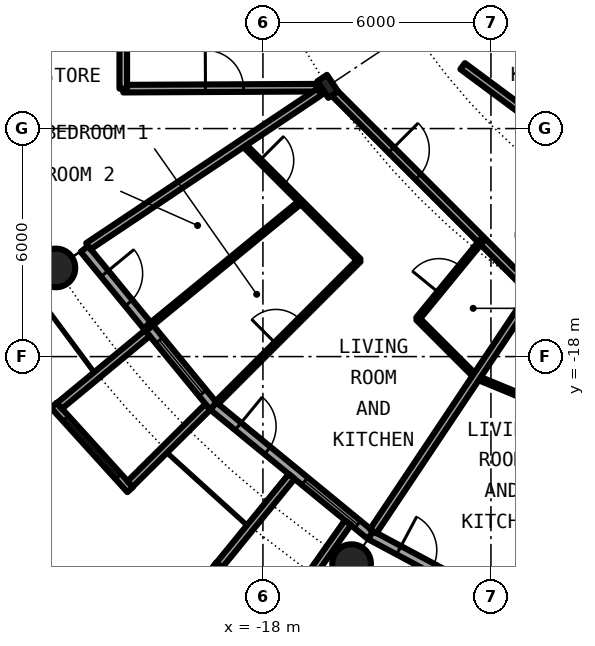
"""IFC4 building model, lengths in metres.
Left out: names, types, materials, properties, quantities, classifications, styles, units other than length and angle.
Written with IfcOpenShell. Run it as: python <this file> out.ifc"""

import sys

from ifc_helpers import new_model, si_unit, direction, frame, frame_2d, origin, origin_2d, place, context, subcontext, project, spatial, rectangle, circle, hollow_circle, i_section, extrude, element, fill, save


model = new_model("IFC4")
c1 = context("Model", 3, precision=1e-05, world=origin(), true_north=direction((0.0, 1.0)))
c2 = subcontext(c1, "Body", "Model", "MODEL_VIEW")
j1 = project(units=[si_unit("LENGTHUNIT", "METRE"), si_unit("PLANEANGLEUNIT", "RADIAN")], contexts=[c1])
p1 = place(None, origin())
s1 = spatial("IfcSite", under=j1, at=p1, CompositionType="ELEMENT")
p2 = place(p1, origin())
s2 = spatial("IfcBuilding", under=s1, at=p2, CompositionType="ELEMENT")
p3 = place(p2, frame((0.0, 0.0, 63.6)))
s3 = spatial("IfcBuildingStorey", under=s2, at=p3, CompositionType="ELEMENT", Elevation=63.6)
for number, where, z_axis, x_axis in (
    (1, (-23.448, -15.667, 0.0), (0.0, 0.0, 1.0), (1.0, 0.0, 0.0)),
    (2, (-15.667, -23.448, 0.0), (0.0, 0.0, 1.0), (1.0, 0.0, 0.0)),
):
    element("IfcColumn", number, at=place(p3, frame(where, z_axis=z_axis, x_axis=x_axis)), inside=s3, PredefinedType="COLUMN", context=c2, shape_type="SweptSolid", body=[
        extrude(hollow_circle(Radius=0.508, WallThickness=0.04, at=origin_2d()), origin(), (0.0, 0.0, 1.0), 3.05),
    ])
p4 = place(p3, frame((-16.297, -10.889, 0.0), z_axis=(0.0, 0.0, 1.0), x_axis=(-0.831469612303, -0.55557023302, 0.0)))
e3 = element("IfcColumn", 3, at=p4, inside=s3, PredefinedType="COLUMN", context=c2, shape_type="SweptSolid", body=[
    extrude(i_section(OverallWidth=0.306, OverallDepth=0.524, WebThickness=0.021, FlangeThickness=0.04, FilletRadius=0.027, at=origin_2d()), origin(), (0.0, 0.0, 1.0), 3.05),
])
p5 = place(p3, frame((-22.699, -15.167, 0.0), z_axis=(0.0, 0.0, 1.0), x_axis=(0.634382322723, -0.773019449054, 0.0)))
e4 = element("IfcWall", 4, at=p5, inside=s3, PredefinedType="SOLIDWALL", context=c2, shape_type="SweptSolid", body=[
    extrude(rectangle(XDim=5.352, YDim=0.25, at=frame_2d((2.676, 0.0))), origin(), (0.0, 0.0, 1.0), 2.7),
])
p6 = place(p5, frame((0.841, 0.0, 0.0)))
e5 = element("IfcOpeningElement", 5, at=p6, cuts=e4, PredefinedType="OPENING", context=c2, shape_type="SweptSolid", body=[
    extrude(rectangle(XDim=1.0, YDim=2.2, at=frame_2d((0.5, 1.1))), frame((0.0, 0.135, 0.0), z_axis=(0.0, -1.0, 0.0), x_axis=(1.0, 0.0, 0.0)), (0.0, 0.0, 1.0), 0.27),
])
p7 = place(p5, frame((3.111, 0.0, 0.3)))
e6 = element("IfcOpeningElement", 6, at=p7, cuts=e4, PredefinedType="OPENING", context=c2, shape_type="SweptSolid", body=[
    extrude(rectangle(XDim=1.8, YDim=2.1, at=frame_2d((0.9, 1.05))), frame((0.0, 0.135, 0.0), z_axis=(0.0, -1.0, 0.0), x_axis=(1.0, 0.0, 0.0)), (0.0, 0.0, 1.0), 0.27),
])
p8 = place(p3, frame((-23.503, -19.282, -0.03), z_axis=(0.0, 0.0, 1.0), x_axis=(0.671506829416, -0.740998365753, 0.0)))
e7 = element("IfcWall", 7, at=p8, inside=s3, PredefinedType="SOLIDWALL", context=c2, shape_type="SweptSolid", body=[
    extrude(rectangle(XDim=2.993, YDim=0.2, at=frame_2d((1.497, 0.0))), origin(), (0.0, 0.0, 1.0), 2.73),
])
p9 = place(p8, frame((0.457, 0.0, 0.33)))
e8 = element("IfcOpeningElement", 8, at=p9, cuts=e7, PredefinedType="OPENING", context=c2, shape_type="SweptSolid", body=[
    extrude(circle(Radius=1.04, at=frame_2d((1.04, 1.04))), frame((0.0, 0.11, 0.0), z_axis=(0.0, -1.0, 0.0), x_axis=(1.0, 0.0, 0.0)), (0.0, 0.0, 1.0), 0.22),
])
p10 = place(p3, frame((-21.041, -17.384, -0.03), z_axis=(0.0, 0.0, 1.0), x_axis=(-0.770784861449, -0.63709551667, 0.0)))
e9 = element("IfcWall", 9, at=p10, inside=s3, PredefinedType="SOLIDWALL", context=c2, shape_type="SweptSolid", body=[
    extrude(rectangle(XDim=3.006, YDim=0.2, at=frame_2d((1.503, 0.0))), origin(), (0.0, 0.0, 1.0), 2.73),
])
p11 = place(p3, frame((-19.45, -19.323, -0.03), z_axis=(0.0, 0.0, 1.0), x_axis=(-0.709727076896, -0.704476739375, 0.0)))
e10 = element("IfcWall", 10, at=p11, inside=s3, PredefinedType="SOLIDWALL", context=c2, shape_type="SweptSolid", body=[
    extrude(rectangle(XDim=2.883, YDim=0.2, at=frame_2d((1.441, 0.0))), origin(), (0.0, 0.0, 1.0), 2.73),
])
p12 = place(p3, frame((-19.304, -19.304, 0.0), z_axis=(0.0, 0.0, 1.0), x_axis=(0.773019449054, -0.634382322723, 0.0)))
e11 = element("IfcWall", 11, at=p12, inside=s3, PredefinedType="SOLIDWALL", context=c2, shape_type="SweptSolid", body=[
    extrude(rectangle(XDim=5.352, YDim=0.25, at=frame_2d((2.676, 0.0))), origin(), (0.0, 0.0, 1.0), 2.7),
])
p13 = place(p12, frame((0.841, 0.0, 0.0)))
e12 = element("IfcOpeningElement", 12, at=p13, cuts=e11, PredefinedType="OPENING", context=c2, shape_type="SweptSolid", body=[
    extrude(rectangle(XDim=1.0, YDim=2.2, at=frame_2d((0.5, 1.1))), frame((0.0, 0.135, 0.0), z_axis=(0.0, -1.0, 0.0), x_axis=(1.0, 0.0, 0.0)), (0.0, 0.0, 1.0), 0.27),
])
p14 = place(p12, frame((3.111, 0.0, 0.3)))
e13 = element("IfcOpeningElement", 13, at=p14, cuts=e11, PredefinedType="OPENING", context=c2, shape_type="SweptSolid", body=[
    extrude(rectangle(XDim=1.8, YDim=2.1, at=frame_2d((0.9, 1.05))), frame((0.0, 0.135, 0.0), z_axis=(0.0, -1.0, 0.0), x_axis=(1.0, 0.0, 0.0)), (0.0, 0.0, 1.0), 0.27),
])
p15 = place(p3, frame((-19.289, -23.497, -0.03), z_axis=(0.0, 0.0, 1.0), x_axis=(0.796842165306, -0.60418752353, 0.0)))
e14 = element("IfcWall", 14, at=p15, inside=s3, PredefinedType="SOLIDWALL", context=c2, shape_type="SweptSolid", body=[
    extrude(rectangle(XDim=2.337, YDim=0.2, at=frame_2d((1.168, 0.0))), origin(), (0.0, 0.0, 1.0), 2.73),
])
p16 = place(p15, frame((0.128, 0.0, 0.33)))
e15 = element("IfcOpeningElement", 15, at=p16, cuts=e14, PredefinedType="OPENING", context=c2, shape_type="SweptSolid", body=[
    extrude(circle(Radius=1.04, at=frame_2d((1.04, 1.04))), frame((0.0, 0.11, 0.0), z_axis=(0.0, -1.0, 0.0), x_axis=(1.0, 0.0, 0.0)), (0.0, 0.0, 1.0), 0.22),
])
p17 = place(p3, frame((-17.246, -21.155, -0.03), z_axis=(0.0, 0.0, 1.0), x_axis=(-0.631741648902, -0.775179004516, 0.0)))
e16 = element("IfcWall", 16, at=p17, inside=s3, PredefinedType="SOLIDWALL", context=c2, shape_type="SweptSolid", body=[
    extrude(rectangle(XDim=3.006, YDim=0.2, at=frame_2d((1.503, 0.0))), origin(), (0.0, 0.0, 1.0), 2.73),
])
p18 = place(p3, frame((-15.765, -22.37, -0.03), z_axis=(0.0, 0.0, 1.0), x_axis=(-0.576274612209, -0.817256123454, 0.0)))
e17 = element("IfcWall", 17, at=p18, inside=s3, PredefinedType="SOLIDWALL", context=c2, shape_type="SweptSolid", body=[
    extrude(rectangle(XDim=2.933, YDim=0.2, at=frame_2d((1.466, 0.0))), origin(), (0.0, 0.0, 1.0), 2.73),
])
p19 = place(p3, frame((-15.167, -22.699, 0.0), z_axis=(0.0, 0.0, 1.0), x_axis=(0.881915646801, -0.471407246368, 0.0)))
e18 = element("IfcWall", 18, at=p19, inside=s3, PredefinedType="SOLIDWALL", context=c2, shape_type="SweptSolid", body=[
    extrude(rectangle(XDim=5.352, YDim=0.25, at=frame_2d((2.676, 0.0))), origin(), (0.0, 0.0, 1.0), 2.7),
])
p20 = place(p19, frame((0.841, 0.0, 0.0)))
e19 = element("IfcOpeningElement", 19, at=p20, cuts=e18, PredefinedType="OPENING", context=c2, shape_type="SweptSolid", body=[
    extrude(rectangle(XDim=1.0, YDim=2.2, at=frame_2d((0.5, 1.1))), frame((0.0, 0.135, 0.0), z_axis=(0.0, -1.0, 0.0), x_axis=(1.0, 0.0, 0.0)), (0.0, 0.0, 1.0), 0.27),
])
p21 = place(p19, frame((3.111, 0.0, 0.3)))
e20 = element("IfcOpeningElement", 20, at=p21, cuts=e18, PredefinedType="OPENING", context=c2, shape_type="SweptSolid", body=[
    extrude(rectangle(XDim=1.8, YDim=2.1, at=frame_2d((0.9, 1.05))), frame((0.0, 0.135, 0.0), z_axis=(0.0, -1.0, 0.0), x_axis=(1.0, 0.0, 0.0)), (0.0, 0.0, 1.0), 0.27),
])
p22 = place(p3, frame((-18.545, -12.386, 0.0), z_axis=(0.0, 0.0, 1.0), x_axis=(0.707106781187, -0.707106781187, 0.0)))
e21 = element("IfcWall", 21, at=p22, inside=s3, PredefinedType="PARTITIONING", context=c2, shape_type="SweptSolid", body=[
    extrude(rectangle(XDim=4.351, YDim=0.1, at=frame_2d((2.176, 0.0))), origin(), (0.0, 0.0, 1.0), 2.7),
])
p23 = place(p22, frame((0.644, 0.0, 0.0)))
e22 = element("IfcOpeningElement", 22, at=p23, cuts=e21, PredefinedType="OPENING", context=c2, shape_type="SweptSolid", body=[
    extrude(rectangle(XDim=0.9, YDim=2.3, at=frame_2d((0.45, 1.15))), frame((0.0, 0.06, 0.0), z_axis=(0.0, -1.0, 0.0), x_axis=(1.0, 0.0, 0.0)), (0.0, 0.0, 1.0), 0.12),
])
p24 = place(p3, frame((-13.927, -17.004, 0.0), z_axis=(0.0, 0.0, 1.0), x_axis=(0.707106781187, -0.707106781187, 0.0)))
e23 = element("IfcWall", 23, at=p24, inside=s3, PredefinedType="PARTITIONING", context=c2, shape_type="SweptSolid", body=[
    extrude(rectangle(XDim=2.175, YDim=0.1, at=frame_2d((1.088, 0.0))), origin(), (0.0, 0.0, 1.0), 2.7),
])
p25 = place(p3, frame((-12.392, -18.541, 0.0), z_axis=(0.0, 0.0, 1.0), x_axis=(0.923901895183, -0.382629439638, 0.0)))
e24 = element("IfcWall", 24, at=p25, inside=s3, PredefinedType="PARTITIONING", context=c2, shape_type="SweptSolid", body=[
    extrude(rectangle(XDim=2.175, YDim=0.1, at=frame_2d((1.087, 0.0))), origin(), (0.0, 0.0, 1.0), 2.7),
])
p26 = place(p3, frame((-16.186, -11.0, 0.0), z_axis=(0.0, 0.0, 1.0), x_axis=(0.707106781187, -0.707106781187, 0.0)))
e25 = element("IfcWall", 25, at=p26, inside=s3, PredefinedType="PARTITIONING", context=c2, shape_type="SweptSolid", body=[
    extrude(rectangle(XDim=7.334, YDim=0.2, at=frame_2d((3.667, 0.0))), origin(), (0.0, 0.0, 1.0), 2.38),
])
p27 = place(p26, frame((2.211, 0.0, 0.0)))
e26 = element("IfcOpeningElement", 26, at=p27, cuts=e25, PredefinedType="OPENING", context=c2, shape_type="SweptSolid", body=[
    extrude(rectangle(XDim=1.0, YDim=2.3, at=frame_2d((0.5, 1.15))), frame((0.0, 0.11, 0.0), z_axis=(0.0, -1.0, 0.0), x_axis=(1.0, 0.0, 0.0)), (0.0, 0.0, 1.0), 0.22),
])
p28 = place(p3, frame((-12.745, -10.358, 0.0), z_axis=(0.0, 0.0, 1.0), x_axis=(0.803191461888, -0.595720971219, 0.0)))
e27 = element("IfcWall", 27, at=p28, inside=s3, PredefinedType="PARTITIONING", context=c2, shape_type="SweptSolid", body=[
    extrude(rectangle(XDim=9.76, YDim=0.2, at=frame_2d((4.88, 0.0))), origin(), (0.0, 0.0, 1.0), 2.7),
])
p29 = place(p28, frame((4.38, 0.0, 0.0)))
e28 = element("IfcOpeningElement", 28, at=p29, cuts=e27, PredefinedType="OPENING", context=c2, shape_type="SweptSolid", body=[
    extrude(rectangle(XDim=1.0, YDim=2.3, at=frame_2d((0.5, 1.15))), frame((0.0, 0.11, 0.0), z_axis=(0.0, -1.0, 0.0), x_axis=(1.0, 0.0, 0.0)), (0.0, 0.0, 1.0), 0.22),
])
p30 = place(p3, frame((-21.675, -10.95, 0.0), z_axis=(0.0, 0.0, 1.0), x_axis=(0.999988019025, 0.004895079807, 0.0)))
e29 = element("IfcWall", 29, at=p30, inside=s3, PredefinedType="PARTITIONING", context=c2, shape_type="SweptSolid", body=[
    extrude(rectangle(XDim=5.087, YDim=0.2, at=frame_2d((2.543, 0.0))), origin(), (0.0, 0.0, 1.0), 2.7),
])
p31 = place(p30, frame((2.163, 0.0, 0.0)))
e30 = element("IfcOpeningElement", 30, at=p31, cuts=e29, PredefinedType="OPENING", context=c2, shape_type="SweptSolid", body=[
    extrude(rectangle(XDim=1.0, YDim=2.3, at=frame_2d((0.5, 1.15))), frame((0.0, 0.11, 0.0), z_axis=(0.0, -1.0, 0.0), x_axis=(1.0, 0.0, 0.0)), (0.0, 0.0, 1.0), 0.22),
])
p32 = place(p3, frame((-22.595, -15.097, 0.0), z_axis=(0.0, 0.0, 1.0), x_axis=(0.831505405283, 0.555516661303, 0.0)))
e31 = element("IfcWall", 31, at=p32, inside=s3, PredefinedType="PARTITIONING", context=c2, shape_type="SweptSolid", body=[
    extrude(rectangle(XDim=7.312, YDim=0.2, at=frame_2d((3.656, 0.0))), origin(), (0.0, 0.0, 1.0), 2.7),
])
p33 = place(p3, frame((-21.023, -17.22, 0.0), z_axis=(0.0, 0.0, 1.0), x_axis=(0.773517471898, 0.633774976367, 0.0)))
e32 = element("IfcWall", 32, at=p33, inside=s3, PredefinedType="PARTITIONING", context=c2, shape_type="SweptSolid", body=[
    extrude(rectangle(XDim=5.196, YDim=0.1, at=frame_2d((2.598, 0.0))), origin(), (0.0, 0.0, 1.0), 2.7),
])
p34 = place(p3, frame((-19.216, -19.216, 0.0), z_axis=(0.0, 0.0, 1.0), x_axis=(0.707106781187, 0.707106781187, 0.0)))
e33 = element("IfcWall", 33, at=p34, inside=s3, PredefinedType="PARTITIONING", context=c2, shape_type="SweptSolid", body=[
    extrude(rectangle(XDim=5.305, YDim=0.1, at=frame_2d((2.652, 0.0))), origin(), (0.0, 0.0, 1.0), 2.7),
])
p35 = place(p34, frame((2.202, 0.0, 0.0)))
e34 = element("IfcOpeningElement", 34, at=p35, cuts=e33, PredefinedType="OPENING", context=c2, shape_type="SweptSolid", body=[
    extrude(rectangle(XDim=0.9, YDim=2.3, at=frame_2d((0.45, 1.15))), frame((0.0, 0.06, 0.0), z_axis=(0.0, -1.0, 0.0), x_axis=(1.0, 0.0, 0.0)), (0.0, 0.0, 1.0), 0.12),
])
p36 = place(p3, frame((-15.098, -22.595, 0.0), z_axis=(0.0, 0.0, 1.0), x_axis=(0.555701298605, 0.831382022135, 0.0)))
e35 = element("IfcWall", 35, at=p36, inside=s3, PredefinedType="PARTITIONING", context=c2, shape_type="SweptSolid", body=[
    extrude(rectangle(XDim=7.313, YDim=0.2, at=frame_2d((3.657, 0.0))), origin(), (0.0, 0.0, 1.0), 2.7),
])
p37 = place(p3, frame((-13.927, -17.004, 0.0), z_axis=(0.0, 0.0, 1.0), x_axis=(0.633582447834, 0.77367517848, 0.0)))
e36 = element("IfcWall", 36, at=p37, inside=s3, PredefinedType="PARTITIONING", context=c2, shape_type="SweptSolid", body=[
    extrude(rectangle(XDim=2.661, YDim=0.1, at=frame_2d((1.331, 0.0))), origin(), (0.0, 0.0, 1.0), 2.7),
])
p38 = place(p37, frame((0.881, 0.0, 0.0)))
e37 = element("IfcOpeningElement", 37, at=p38, cuts=e36, PredefinedType="OPENING", context=c2, shape_type="SweptSolid", body=[
    extrude(rectangle(XDim=0.9, YDim=2.3, at=frame_2d((0.45, 1.15))), frame((0.0, 0.06, 0.0), z_axis=(0.0, -1.0, 0.0), x_axis=(1.0, 0.0, 0.0)), (0.0, 0.0, 1.0), 0.12),
])
p39 = place(p3, frame((-21.675, -10.95, 0.0), z_axis=(0.0, 0.0, 1.0), x_axis=(0.0, 1.0, 0.0)))
e38 = element("IfcWall", 38, at=p39, inside=s3, PredefinedType="PARTITIONING", context=c2, shape_type="SweptSolid", body=[
    extrude(rectangle(XDim=1.65, YDim=0.2, at=frame_2d((0.825, 0.0))), origin(), (0.0, 0.0, 1.0), 2.7),
])
p40 = place(p6, origin())
e39 = element("IfcDoor", 39, at=p40, inside=s3, OperationType="SINGLE_SWING_LEFT", PredefinedType="DOOR", context=c2, shape_type="SweptSolid", body=[
    extrude(rectangle(XDim=1.0, YDim=2.2, at=frame_2d((0.5, 1.1))), frame((0.0, 0.025, 0.0), z_axis=(0.0, -1.0, 0.0), x_axis=(1.0, 0.0, 0.0)), (0.0, 0.0, 1.0), 0.05),
])
fill(e5, e39)
p41 = place(p7, origin())
e40 = element("IfcWindow", 40, at=p41, inside=s3, PartitioningType="SINGLE_PANEL", PredefinedType="WINDOW", context=c2, shape_type="SweptSolid", body=[
    extrude(rectangle(XDim=1.8, YDim=2.1, at=frame_2d((0.9, 1.05))), frame((0.0, 0.03, 0.0), z_axis=(0.0, -1.0, 0.0), x_axis=(1.0, 0.0, 0.0)), (0.0, 0.0, 1.0), 0.06),
])
fill(e6, e40)
p42 = place(p9, origin())
e41 = element("IfcWindow", 41, at=p42, inside=s3, PartitioningType="SINGLE_PANEL", PredefinedType="WINDOW", context=c2, shape_type="SweptSolid", body=[
    extrude(circle(Radius=1.04, at=frame_2d((1.04, 1.04))), frame((0.0, 0.03, 0.0), z_axis=(0.0, -1.0, 0.0), x_axis=(1.0, 0.0, 0.0)), (0.0, 0.0, 1.0), 0.06),
])
fill(e8, e41)
p43 = place(p13, origin())
e42 = element("IfcDoor", 42, at=p43, inside=s3, OperationType="SINGLE_SWING_LEFT", PredefinedType="DOOR", context=c2, shape_type="SweptSolid", body=[
    extrude(rectangle(XDim=1.0, YDim=2.2, at=frame_2d((0.5, 1.1))), frame((0.0, 0.025, 0.0), z_axis=(0.0, -1.0, 0.0), x_axis=(1.0, 0.0, 0.0)), (0.0, 0.0, 1.0), 0.05),
])
fill(e12, e42)
p44 = place(p14, origin())
e43 = element("IfcWindow", 43, at=p44, inside=s3, PartitioningType="SINGLE_PANEL", PredefinedType="WINDOW", context=c2, shape_type="SweptSolid", body=[
    extrude(rectangle(XDim=1.8, YDim=2.1, at=frame_2d((0.9, 1.05))), frame((0.0, 0.03, 0.0), z_axis=(0.0, -1.0, 0.0), x_axis=(1.0, 0.0, 0.0)), (0.0, 0.0, 1.0), 0.06),
])
fill(e13, e43)
p45 = place(p20, origin())
e44 = element("IfcDoor", 44, at=p45, inside=s3, OperationType="SINGLE_SWING_LEFT", PredefinedType="DOOR", context=c2, shape_type="SweptSolid", body=[
    extrude(rectangle(XDim=1.0, YDim=2.2, at=frame_2d((0.5, 1.1))), frame((0.0, 0.025, 0.0), z_axis=(0.0, -1.0, 0.0), x_axis=(1.0, 0.0, 0.0)), (0.0, 0.0, 1.0), 0.05),
])
fill(e19, e44)
p46 = place(p27, origin())
e45 = element("IfcDoor", 45, at=p46, inside=s3, OperationType="SINGLE_SWING_LEFT", PredefinedType="DOOR", context=c2, shape_type="SweptSolid", body=[
    extrude(rectangle(XDim=1.0, YDim=2.3, at=frame_2d((0.5, 1.15))), frame((0.0, 0.025, 0.0), z_axis=(0.0, -1.0, 0.0), x_axis=(1.0, 0.0, 0.0)), (0.0, 0.0, 1.0), 0.05),
])
fill(e26, e45)
p47 = place(p38, origin())
e46 = element("IfcDoor", 46, at=p47, inside=s3, OperationType="SINGLE_SWING_RIGHT", PredefinedType="DOOR", context=c2, shape_type="SweptSolid", body=[
    extrude(rectangle(XDim=0.9, YDim=2.3, at=frame_2d((0.45, 1.15))), frame((0.0, 0.025, 0.0), z_axis=(0.0, -1.0, 0.0), x_axis=(1.0, 0.0, 0.0)), (0.0, 0.0, 1.0), 0.05),
])
fill(e37, e46)
p48 = place(p35, origin())
e47 = element("IfcDoor", 47, at=p48, inside=s3, OperationType="SINGLE_SWING_LEFT", PredefinedType="DOOR", context=c2, shape_type="SweptSolid", body=[
    extrude(rectangle(XDim=0.9, YDim=2.3, at=frame_2d((0.45, 1.15))), frame((0.0, 0.025, 0.0), z_axis=(0.0, -1.0, 0.0), x_axis=(1.0, 0.0, 0.0)), (0.0, 0.0, 1.0), 0.05),
])
fill(e34, e47)
p49 = place(p23, origin())
e48 = element("IfcDoor", 48, at=p49, inside=s3, OperationType="SINGLE_SWING_LEFT", PredefinedType="DOOR", context=c2, shape_type="SweptSolid", body=[
    extrude(rectangle(XDim=0.9, YDim=2.3, at=frame_2d((0.45, 1.15))), frame((0.0, 0.025, 0.0), z_axis=(0.0, -1.0, 0.0), x_axis=(1.0, 0.0, 0.0)), (0.0, 0.0, 1.0), 0.05),
])
fill(e22, e48)
p50 = place(p31, origin())
e49 = element("IfcDoor", 49, at=p50, inside=s3, OperationType="SINGLE_SWING_RIGHT", PredefinedType="DOOR", context=c2, shape_type="SweptSolid", body=[
    extrude(rectangle(XDim=1.0, YDim=2.3, at=frame_2d((0.5, 1.15))), frame((0.0, 0.025, 0.0), z_axis=(0.0, -1.0, 0.0), x_axis=(1.0, 0.0, 0.0)), (0.0, 0.0, 1.0), 0.05),
])
fill(e30, e49)
save(model, sys.argv[1])
